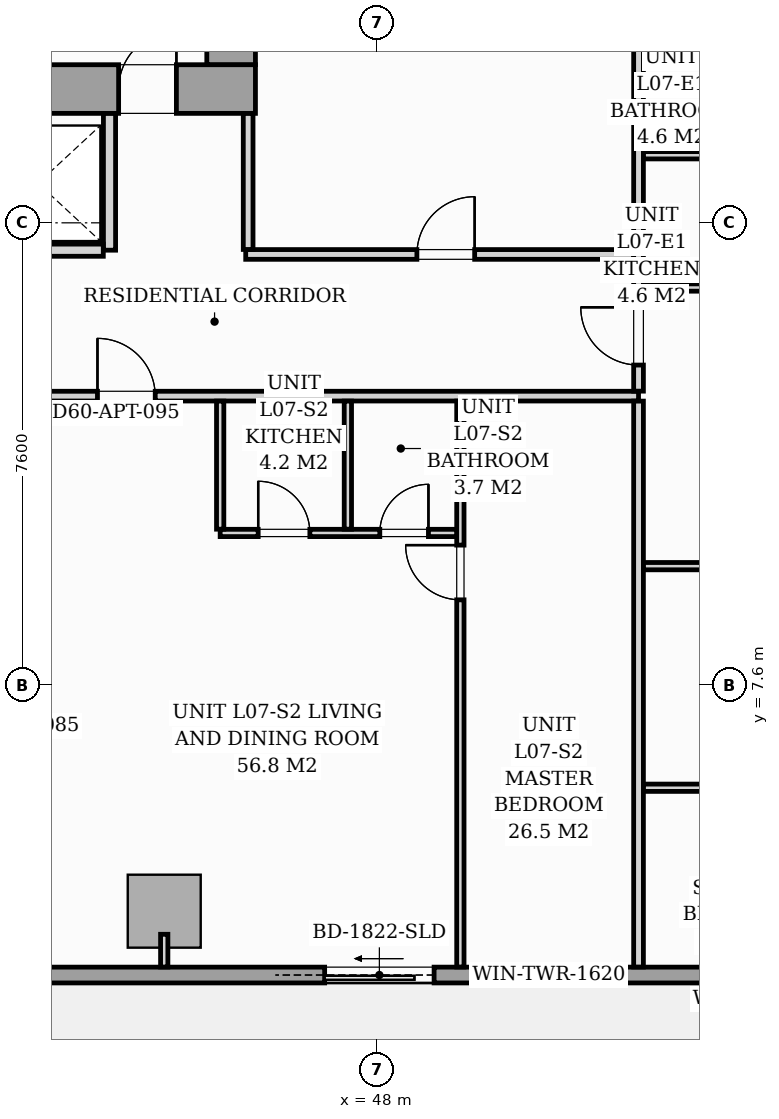
"""IFC4 building model, lengths in metres.
Left out: names, types, materials, properties, quantities, classifications, styles, units other than length and angle.
Written with IfcOpenShell. Run it as: python <this file> out.ifc"""

import sys

from ifc_helpers import new_model, si_unit, direction, frame, frame_2d, origin, origin_2d, place, context, subcontext, project, spatial, rectangle, i_section, extrude, source, transform, mapped, element, fill, save


model = new_model("IFC4")
c1 = context("Model", 3, precision=1e-05, world=origin(), true_north=direction((0.0, 1.0)))
c2 = subcontext(c1, "Body", "Model", "MODEL_VIEW")
j1 = project(units=[si_unit("LENGTHUNIT", "METRE"), si_unit("PLANEANGLEUNIT", "RADIAN")], contexts=[c1])
p1 = place(None, origin())
s1 = spatial("IfcSite", under=j1, at=p1, CompositionType="ELEMENT")
p2 = place(p1, origin())
s2 = spatial("IfcBuilding", under=s1, at=p2, CompositionType="ELEMENT")
p3 = place(p2, frame((0.0, 0.0, 29.4)))
s3 = spatial("IfcBuildingStorey", under=s2, at=p3, CompositionType="ELEMENT", Elevation=29.4)
m1 = source(origin(), c2, "Body", "SweptSolid", [
    extrude(i_section(OverallWidth=0.437, OverallDepth=0.514, WebThickness=0.061, FlangeThickness=0.097, FilletRadius=0.018, at=origin_2d()), origin(), (0.0, 0.0, 1.0), 3.196),
])
p4 = place(p3, frame((45.6, 17.4, 0.002), z_axis=(0.0, 0.0, 1.0), x_axis=(1.0, 0.0, 0.0)))
e1 = element("IfcColumn", 1, at=p4, inside=s3, PredefinedType="PILASTER", context=c2, shape_type="MappedRepresentation", body=[
    mapped(m1, transform((0.0, 0.0, 0.0), scale=1.0)),
])
m2 = source(origin(), c2, "Body", "SweptSolid", [
    extrude(rectangle(XDim=1.2, YDim=1.2, at=origin_2d()), origin(), (0.0, 0.0, 1.0), 3.196),
])
p5 = place(p3, frame((44.5, 3.88, 0.002), z_axis=(0.0, 0.0, 1.0), x_axis=(1.0, 0.0, 0.0)))
e2 = element("IfcColumn", 2, at=p5, inside=s3, PredefinedType="COLUMN", context=c2, shape_type="MappedRepresentation", body=[
    mapped(m2, transform((0.0, 0.0, 0.0), scale=1.0)),
])
p6 = place(p3, frame((57.3, 2.83, 0.0), z_axis=(0.0, 0.0, 1.0), x_axis=(-1.0, 0.0, 0.0)))
e3 = element("IfcWall", 3, at=p6, inside=s3, PredefinedType="STANDARD", context=c2, shape_type="SweptSolid", body=[
    extrude(rectangle(XDim=17.15, YDim=0.26, at=frame_2d((8.575, 0.0))), origin(), (0.0, 0.0, 1.0), 2.94),
])
p7 = place(p6, frame((8.362, 0.0, 0.0)))
e4 = element("IfcOpeningElement", 4, at=p7, cuts=e3, PredefinedType="OPENING", context=c2, shape_type="SweptSolid", body=[
    extrude(rectangle(XDim=1.8, YDim=2.06, at=frame_2d((0.9, 1.03))), frame((0.0, 0.14, 0.0), z_axis=(0.0, -1.0, 0.0), x_axis=(1.0, 0.0, 0.0)), (0.0, 0.0, 1.0), 0.28),
])
p8 = place(p6, frame((2.05, 0.0, 0.65)))
e5 = element("IfcOpeningElement", 5, at=p8, cuts=e3, PredefinedType="OPENING", context=c2, shape_type="SweptSolid", body=[
    extrude(rectangle(XDim=1.6, YDim=1.5, at=frame_2d((0.8, 0.75))), frame((0.0, 0.14, 0.0), z_axis=(0.0, -1.0, 0.0), x_axis=(1.0, 0.0, 0.0)), (0.0, 0.0, 1.0), 0.28),
])
p9 = place(p6, frame((5.675, 0.0, 0.75)))
e6 = element("IfcOpeningElement", 6, at=p9, cuts=e3, PredefinedType="OPENING", context=c2, shape_type="SweptSolid", body=[
    extrude(rectangle(XDim=1.6, YDim=1.5, at=frame_2d((0.8, 0.75))), frame((0.0, 0.14, 0.0), z_axis=(0.0, -1.0, 0.0), x_axis=(1.0, 0.0, 0.0)), (0.0, 0.0, 1.0), 0.28),
])
p10 = place(p3, frame((26.0, 17.4, 0.0), z_axis=(0.0, 0.0, 1.0), x_axis=(1.0, 0.0, 0.0)))
e7 = element("IfcWall", 7, at=p10, inside=s3, PredefinedType="SHEAR", context=c2, shape_type="SweptSolid", body=[
    extrude(rectangle(XDim=20.0, YDim=0.8, at=frame_2d((10.0, 0.0))), origin(), (0.0, 0.0, 1.0), 3.2),
])
p11 = place(p10, frame((1.15, 0.0, 0.0)))
e8 = element("IfcOpeningElement", 8, at=p11, cuts=e7, PredefinedType="OPENING", context=c2, shape_type="SweptSolid", body=[
    extrude(rectangle(XDim=0.95, YDim=2.06, at=frame_2d((0.475, 1.03))), frame((0.0, 0.41, 0.0), z_axis=(0.0, -1.0, 0.0), x_axis=(1.0, 0.0, 0.0)), (0.0, 0.0, 1.0), 0.82),
])
p12 = place(p10, frame((9.58, 0.0, 0.0)))
e9 = element("IfcOpeningElement", 9, at=p12, cuts=e7, PredefinedType="OPENING", context=c2, shape_type="SweptSolid", body=[
    extrude(rectangle(XDim=0.85, YDim=2.0, at=frame_2d((0.425, 1.0))), frame((0.0, 0.41, 0.0), z_axis=(0.0, -1.0, 0.0), x_axis=(1.0, 0.0, 0.0)), (0.0, 0.0, 1.0), 0.82),
])
p13 = place(p10, frame((17.75, 0.0, 0.0)))
e10 = element("IfcOpeningElement", 10, at=p13, cuts=e7, PredefinedType="OPENING", context=c2, shape_type="SweptSolid", body=[
    extrude(rectangle(XDim=0.95, YDim=2.06, at=frame_2d((0.475, 1.03))), frame((0.0, 0.41, 0.0), z_axis=(0.0, -1.0, 0.0), x_axis=(1.0, 0.0, 0.0)), (0.0, 0.0, 1.0), 0.82),
])
p14 = place(p3, frame((45.6, 17.802, 0.0), z_axis=(0.0, 0.0, 1.0), x_axis=(0.0, 1.0, 0.0)))
e11 = element("IfcWall", 11, at=p14, inside=s3, PredefinedType="SHEAR", context=c2, shape_type="SweptSolid", body=[
    extrude(rectangle(XDim=5.796, YDim=0.8, at=frame_2d((2.898, 0.0))), origin(), (0.0, 0.0, 1.0), 3.2),
])
p15 = place(p3, frame((43.6, 14.75, 0.0), z_axis=(0.0, 0.0, 1.0), x_axis=(0.0, 1.0, 0.0)))
e12 = element("IfcWall", 12, at=p15, inside=s3, PredefinedType="PARTITIONING", context=c2, shape_type="SweptSolid", body=[
    extrude(rectangle(XDim=2.248, YDim=0.2, at=frame_2d((1.124, 0.0))), origin(), (0.0, 0.0, 1.0), 2.94),
])
p16 = place(p3, frame((41.352, 14.75, 0.0), z_axis=(0.0, 0.0, 1.0), x_axis=(1.0, 0.0, 0.0)))
e13 = element("IfcWall", 13, at=p16, inside=s3, PredefinedType="PARTITIONING", context=c2, shape_type="SweptSolid", body=[
    extrude(rectangle(XDim=2.146, YDim=0.2, at=frame_2d((1.073, 0.0))), origin(), (0.0, 0.0, 1.0), 2.94),
])
p17 = place(p3, frame((15.2, 12.35, 0.0), z_axis=(0.0, 0.0, 1.0), x_axis=(1.0, 0.0, 0.0)))
e14 = element("IfcWall", 14, at=p17, inside=s3, PredefinedType="PARTITIONING", context=c2, shape_type="SweptSolid", body=[
    extrude(rectangle(XDim=37.1, YDim=0.16, at=frame_2d((18.55, 0.0))), origin(), (0.0, 0.0, 1.0), 2.94),
])
p18 = place(p17, frame((2.964, 0.0, 0.0)))
e15 = element("IfcOpeningElement", 15, at=p18, cuts=e14, PredefinedType="OPENING", context=c2, shape_type="SweptSolid", body=[
    extrude(rectangle(XDim=0.95, YDim=2.06, at=frame_2d((0.475, 1.03))), frame((0.0, 0.09, 0.0), z_axis=(0.0, -1.0, 0.0), x_axis=(1.0, 0.0, 0.0)), (0.0, 0.0, 1.0), 0.18),
])
p19 = place(p17, frame((28.202, 0.0, 0.0)))
e16 = element("IfcOpeningElement", 16, at=p19, cuts=e14, PredefinedType="OPENING", context=c2, shape_type="SweptSolid", body=[
    extrude(rectangle(XDim=0.95, YDim=2.06, at=frame_2d((0.475, 1.03))), frame((0.0, 0.09, 0.0), z_axis=(0.0, -1.0, 0.0), x_axis=(1.0, 0.0, 0.0)), (0.0, 0.0, 1.0), 0.18),
])
p20 = place(p3, frame((52.3, 2.962, 0.0), z_axis=(0.0, 0.0, 1.0), x_axis=(0.0, 1.0, 0.0)))
e17 = element("IfcWall", 17, at=p20, inside=s3, PredefinedType="PARTITIONING", context=c2, shape_type="SweptSolid", body=[
    extrude(rectangle(XDim=9.306, YDim=0.16, at=frame_2d((4.653, 0.0))), origin(), (0.0, 0.0, 1.0), 2.94),
])
p21 = place(p3, frame((52.3, 12.432, 0.0), z_axis=(0.0, 0.0, 1.0), x_axis=(0.0, 1.0, 0.0)))
e18 = element("IfcWall", 18, at=p21, inside=s3, PredefinedType="PARTITIONING", context=c2, shape_type="SweptSolid", body=[
    extrude(rectangle(XDim=15.006, YDim=0.16, at=frame_2d((7.503, 0.0))), origin(), (0.0, 0.0, 1.0), 2.94),
])
p22 = place(p21, frame((0.429, 0.0, 0.0)))
e19 = element("IfcOpeningElement", 19, at=p22, cuts=e18, PredefinedType="OPENING", context=c2, shape_type="SweptSolid", body=[
    extrude(rectangle(XDim=0.95, YDim=2.06, at=frame_2d((0.475, 1.03))), frame((0.0, 0.09, 0.0), z_axis=(0.0, -1.0, 0.0), x_axis=(1.0, 0.0, 0.0)), (0.0, 0.0, 1.0), 0.18),
])
p23 = place(p3, frame((49.37, 2.962, 0.0), z_axis=(0.0, 0.0, 1.0), x_axis=(0.0, 1.0, 0.0)))
e20 = element("IfcWall", 20, at=p23, inside=s3, PredefinedType="PARTITIONING", context=c2, shape_type="SweptSolid", body=[
    extrude(rectangle(XDim=9.306, YDim=0.12, at=frame_2d((4.653, 0.0))), origin(), (0.0, 0.0, 1.0), 2.94),
])
p24 = place(p23, frame((6.038, 0.0, 0.0)))
e21 = element("IfcOpeningElement", 21, at=p24, cuts=e20, PredefinedType="OPENING", context=c2, shape_type="SweptSolid", body=[
    extrude(rectangle(XDim=0.9, YDim=2.05, at=frame_2d((0.45, 1.025))), frame((0.0, 0.07, 0.0), z_axis=(0.0, -1.0, 0.0), x_axis=(1.0, 0.0, 0.0)), (0.0, 0.0, 1.0), 0.14),
])
p25 = place(p3, frame((45.42, 10.1, 0.0), z_axis=(0.0, 0.0, 1.0), x_axis=(1.0, 0.0, 0.0)))
e22 = element("IfcWall", 22, at=p25, inside=s3, PredefinedType="PARTITIONING", context=c2, shape_type="SweptSolid", body=[
    extrude(rectangle(XDim=3.888, YDim=0.12, at=frame_2d((1.944, 0.0))), origin(), (0.0, 0.0, 1.0), 2.94),
])
p26 = place(p25, frame((0.625, 0.0, 0.0)))
e23 = element("IfcOpeningElement", 23, at=p26, cuts=e22, PredefinedType="OPENING", context=c2, shape_type="SweptSolid", body=[
    extrude(rectangle(XDim=0.85, YDim=2.05, at=frame_2d((0.425, 1.025))), frame((0.0, 0.07, 0.0), z_axis=(0.0, -1.0, 0.0), x_axis=(1.0, 0.0, 0.0)), (0.0, 0.0, 1.0), 0.14),
])
p27 = place(p25, frame((2.625, 0.0, 0.0)))
e24 = element("IfcOpeningElement", 24, at=p27, cuts=e22, PredefinedType="OPENING", context=c2, shape_type="SweptSolid", body=[
    extrude(rectangle(XDim=0.8, YDim=2.02, at=frame_2d((0.4, 1.01))), frame((0.0, 0.07, 0.0), z_axis=(0.0, -1.0, 0.0), x_axis=(1.0, 0.0, 0.0)), (0.0, 0.0, 1.0), 0.14),
])
for number, where, z_axis, x_axis in (
    (25, (47.52, 10.162, 0.0), (0.0, 0.0, 1.0), (0.0, 1.0, 0.0)),
    (26, (45.42, 10.162, 0.0), (0.0, 0.0, 1.0), (0.0, 1.0, 0.0)),
):
    element("IfcWall", number, at=place(p3, frame(where, z_axis=z_axis, x_axis=x_axis)), inside=s3, PredefinedType="PARTITIONING", context=c2, shape_type="SweptSolid", body=[
        extrude(rectangle(XDim=2.106, YDim=0.12, at=frame_2d((1.053, 0.0))), origin(), (0.0, 0.0, 1.0), 2.94),
    ])
p28 = place(p3, frame((52.382, 16.311, 0.0), z_axis=(0.0, 0.0, 1.0), x_axis=(1.0, 0.0, 0.0)))
e27 = element("IfcWall", 27, at=p28, inside=s3, PredefinedType="PARTITIONING", context=c2, shape_type="SweptSolid", body=[
    extrude(rectangle(XDim=2.256, YDim=0.12, at=frame_2d((1.128, 0.0))), origin(), (0.0, 0.0, 1.0), 2.045),
])
p29 = place(p3, frame((52.382, 14.136, 0.0), z_axis=(0.0, 0.0, 1.0), x_axis=(1.0, 0.0, 0.0)))
e28 = element("IfcWall", 28, at=p29, inside=s3, PredefinedType="PARTITIONING", context=c2, shape_type="SweptSolid", body=[
    extrude(rectangle(XDim=2.256, YDim=0.12, at=frame_2d((1.128, 0.0))), origin(), (0.0, 0.0, 1.0), 2.94),
])
p30 = place(p3, frame((52.382, 5.91, 0.0), z_axis=(0.0, 0.0, 1.0), x_axis=(1.0, 0.0, 0.0)))
e29 = element("IfcWall", 29, at=p30, inside=s3, PredefinedType="PARTITIONING", context=c2, shape_type="SweptSolid", body=[
    extrude(rectangle(XDim=7.338, YDim=0.12, at=frame_2d((3.669, 0.0))), origin(), (0.0, 0.0, 1.0), 2.94),
])
p31 = place(p30, frame((2.34, 0.0, 0.0)))
e30 = element("IfcOpeningElement", 30, at=p31, cuts=e29, PredefinedType="OPENING", context=c2, shape_type="SweptSolid", body=[
    extrude(rectangle(XDim=0.85, YDim=2.05, at=frame_2d((0.425, 1.025))), frame((0.0, 0.07, 0.0), z_axis=(0.0, -1.0, 0.0), x_axis=(1.0, 0.0, 0.0)), (0.0, 0.0, 1.0), 0.14),
])
p32 = place(p3, frame((52.382, 9.554, 0.0), z_axis=(0.0, 0.0, 1.0), x_axis=(1.0, 0.0, 0.0)))
e31 = element("IfcWall", 31, at=p32, inside=s3, PredefinedType="PARTITIONING", context=c2, shape_type="SweptSolid", body=[
    extrude(rectangle(XDim=7.338, YDim=0.12, at=frame_2d((3.669, 0.0))), origin(), (0.0, 0.0, 1.0), 2.94),
])
p33 = place(p32, frame((3.253, 0.0, 0.0)))
e32 = element("IfcOpeningElement", 32, at=p33, cuts=e31, PredefinedType="OPENING", context=c2, shape_type="SweptSolid", body=[
    extrude(rectangle(XDim=0.85, YDim=2.05, at=frame_2d((0.425, 1.025))), frame((0.0, 0.07, 0.0), z_axis=(0.0, -1.0, 0.0), x_axis=(1.0, 0.0, 0.0)), (0.0, 0.0, 1.0), 0.14),
])
p34 = place(p3, frame((45.84, 14.68, 0.0), z_axis=(0.0, 0.0, 1.0), x_axis=(1.0, 0.0, 0.0)))
e33 = element("IfcWall", 33, at=p34, inside=s3, PredefinedType="PARTITIONING", context=c2, shape_type="SweptSolid", body=[
    extrude(rectangle(XDim=6.378, YDim=0.16, at=frame_2d((3.189, 0.0))), origin(), (0.0, 0.0, 1.0), 2.94),
])
p35 = place(p34, frame((2.815, 0.0, 0.0)))
e34 = element("IfcOpeningElement", 34, at=p35, cuts=e33, PredefinedType="OPENING", context=c2, shape_type="SweptSolid", body=[
    extrude(rectangle(XDim=0.95, YDim=2.06, at=frame_2d((0.475, 1.03))), frame((0.0, 0.09, 0.0), z_axis=(0.0, -1.0, 0.0), x_axis=(1.0, 0.0, 0.0)), (0.0, 0.0, 1.0), 0.18),
])
p36 = place(p3, frame((45.88, 14.762, 0.0), z_axis=(0.0, 0.0, 1.0), x_axis=(0.0, 1.0, 0.0)))
e35 = element("IfcWall", 35, at=p36, inside=s3, PredefinedType="PARTITIONING", context=c2, shape_type="SweptSolid", body=[
    extrude(rectangle(XDim=2.236, YDim=0.16, at=frame_2d((1.118, 0.0))), origin(), (0.0, 0.0, 1.0), 2.94),
])
p37 = place(p3, frame((44.5, 3.5, 0.0), z_axis=(0.0, 0.0, 1.0), x_axis=(0.0, -1.0, 0.0)))
e36 = element("IfcWall", 36, at=p37, inside=s3, PredefinedType="PARTITIONING", context=c2, shape_type="SweptSolid", body=[
    extrude(rectangle(XDim=0.538, YDim=0.12, at=frame_2d((0.269, 0.0))), origin(), (0.0, 0.0, 1.0), 2.94),
])
m3 = source(origin(), c2, "Body", "SweptSolid", [
    extrude(rectangle(XDim=1.8, YDim=2.06, at=frame_2d((0.9, 1.03))), frame((0.0, 0.025, 0.0), z_axis=(0.0, -1.0, 0.0), x_axis=(1.0, 0.0, 0.0)), (0.0, 0.0, 1.0), 0.05),
])
p38 = place(p7, origin())
e37 = element("IfcDoor", 37, at=p38, inside=s3, OperationType="SLIDING_TO_RIGHT", PredefinedType="DOOR", context=c2, shape_type="MappedRepresentation", body=[
    mapped(m3, transform((0.0, 0.0, 0.0), scale=1.0)),
])
fill(e4, e37)
m4 = source(origin(), c2, "Body", "SweptSolid", [
    extrude(rectangle(XDim=1.6, YDim=1.5, at=frame_2d((0.8, 0.75))), frame((0.0, 0.03, 0.0), z_axis=(0.0, -1.0, 0.0), x_axis=(1.0, 0.0, 0.0)), (0.0, 0.0, 1.0), 0.06),
])
p39 = place(p9, origin())
e38 = element("IfcWindow", 38, at=p39, inside=s3, PartitioningType="SINGLE_PANEL", PredefinedType="WINDOW", context=c2, shape_type="MappedRepresentation", body=[
    mapped(m4, transform((0.0, 0.0, 0.0), scale=1.0)),
])
fill(e6, e38)
m5 = source(origin(), c2, "Body", "SweptSolid", [
    extrude(rectangle(XDim=0.95, YDim=2.06, at=frame_2d((0.475, 1.03))), frame((0.0, 0.025, 0.0), z_axis=(0.0, -1.0, 0.0), x_axis=(1.0, 0.0, 0.0)), (0.0, 0.0, 1.0), 0.05),
])
p40 = place(p13, origin())
e39 = element("IfcDoor", 39, at=p40, inside=s3, OperationType="SINGLE_SWING_RIGHT", PredefinedType="DOOR", context=c2, shape_type="MappedRepresentation", body=[
    mapped(m5, transform((0.0, 0.0, 0.0), scale=1.0)),
])
fill(e10, e39)
m6 = source(origin(), c2, "Body", "SweptSolid", [
    extrude(rectangle(XDim=0.95, YDim=2.06, at=frame_2d((0.475, 1.03))), frame((0.0, 0.025, 0.0), z_axis=(0.0, -1.0, 0.0), x_axis=(1.0, 0.0, 0.0)), (0.0, 0.0, 1.0), 0.05),
])
p41 = place(p19, origin())
e40 = element("IfcDoor", 40, at=p41, inside=s3, OperationType="SINGLE_SWING_LEFT", PredefinedType="DOOR", context=c2, shape_type="MappedRepresentation", body=[
    mapped(m6, transform((0.0, 0.0, 0.0), scale=1.0)),
])
fill(e16, e40)
m7 = source(origin(), c2, "Body", "SweptSolid", [
    extrude(rectangle(XDim=0.9, YDim=2.05, at=frame_2d((0.45, 1.025))), frame((0.0, 0.025, 0.0), z_axis=(0.0, -1.0, 0.0), x_axis=(1.0, 0.0, 0.0)), (0.0, 0.0, 1.0), 0.05),
])
p42 = place(p24, origin())
e41 = element("IfcDoor", 41, at=p42, inside=s3, OperationType="SINGLE_SWING_RIGHT", PredefinedType="DOOR", context=c2, shape_type="MappedRepresentation", body=[
    mapped(m7, transform((0.0, 0.0, 0.0), scale=1.0)),
])
fill(e21, e41)
m8 = source(origin(), c2, "Body", "SweptSolid", [
    extrude(rectangle(XDim=0.85, YDim=2.05, at=frame_2d((0.425, 1.025))), frame((0.0, 0.025, 0.0), z_axis=(0.0, -1.0, 0.0), x_axis=(1.0, 0.0, 0.0)), (0.0, 0.0, 1.0), 0.05),
])
p43 = place(p26, origin())
e42 = element("IfcDoor", 42, at=p43, inside=s3, OperationType="SINGLE_SWING_LEFT", PredefinedType="DOOR", context=c2, shape_type="MappedRepresentation", body=[
    mapped(m8, transform((0.0, 0.0, 0.0), scale=1.0)),
])
fill(e23, e42)
m9 = source(origin(), c2, "Body", "SweptSolid", [
    extrude(rectangle(XDim=0.8, YDim=2.02, at=frame_2d((0.4, 1.01))), frame((0.0, 0.025, 0.0), z_axis=(0.0, -1.0, 0.0), x_axis=(1.0, 0.0, 0.0)), (0.0, 0.0, 1.0), 0.05),
])
p44 = place(p27, origin())
e43 = element("IfcDoor", 43, at=p44, inside=s3, OperationType="SINGLE_SWING_RIGHT", PredefinedType="DOOR", context=c2, shape_type="MappedRepresentation", body=[
    mapped(m9, transform((0.0, 0.0, 0.0), scale=1.0)),
])
fill(e24, e43)
p45 = place(p22, origin())
e44 = element("IfcDoor", 44, at=p45, inside=s3, OperationType="SINGLE_SWING_RIGHT", PredefinedType="DOOR", context=c2, shape_type="MappedRepresentation", body=[
    mapped(m6, transform((0.0, 0.0, 0.0), scale=1.0)),
])
fill(e19, e44)
p46 = place(p35, origin())
e45 = element("IfcDoor", 45, at=p46, inside=s3, OperationType="SINGLE_SWING_RIGHT", PredefinedType="DOOR", context=c2, shape_type="MappedRepresentation", body=[
    mapped(m6, transform((0.0, 0.0, 0.0), scale=1.0)),
])
fill(e34, e45)
save(model, sys.argv[1])
